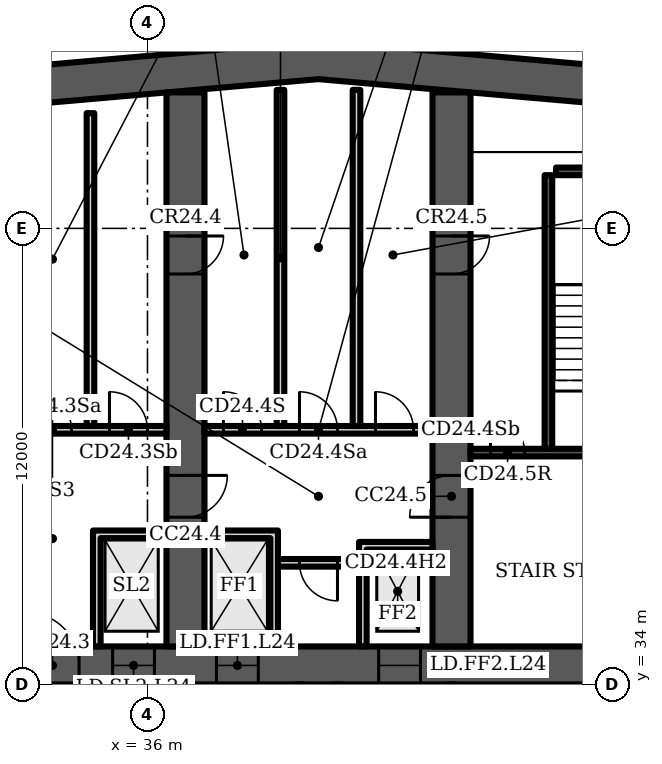
"""IFC4 building model, lengths in metres.
Left out: names, types, materials, properties, quantities, classifications, styles, units other than length and angle.
Written with IfcOpenShell. Run it as: python <this file> out.ifc"""

import sys

from ifc_helpers import new_model, si_unit, direction, frame, frame_2d, origin, place, context, subcontext, project, spatial, polyline, rectangle, outline, extrude, element, fill, save


model = new_model("IFC4")
c1 = context("Model", 3, precision=1e-05, world=origin(), true_north=direction((0.0, 1.0)))
c2 = subcontext(c1, "Body", "Model", "MODEL_VIEW")
j1 = project(units=[si_unit("LENGTHUNIT", "METRE"), si_unit("PLANEANGLEUNIT", "RADIAN")], contexts=[c1])
p1 = place(None, origin())
s1 = spatial("IfcSite", under=j1, at=p1, CompositionType="ELEMENT")
p2 = place(p1, origin())
s2 = spatial("IfcBuilding", under=s1, at=p2, CompositionType="ELEMENT")
p3 = place(p2, frame((0.0, 0.0, 107.5)))
s3 = spatial("IfcBuildingStorey", under=s2, at=p3, CompositionType="ELEMENT", Elevation=107.5)
p4 = place(p3, origin())
e1 = element("IfcWall", 1, at=p4, inside=s3, PredefinedType="SHEAR", context=c2, shape_type="SweptSolid", body=[
    extrude(outline(polyline([(16.0, 47.784), (40.5, 49.927), (65.0, 47.784), (65.0, 48.787), (40.5, 50.931), (16.0, 48.787), (16.0, 47.784)])), origin(), (0.0, 0.0, 1.0), 3.6),
])
p5 = place(p3, frame((16.0, 34.5, 0.0), z_axis=(0.0, 0.0, 1.0), x_axis=(1.0, 0.0, 0.0)))
e2 = element("IfcWall", 2, at=p5, inside=s3, PredefinedType="SHEAR", context=c2, shape_type="SweptSolid", body=[
    extrude(rectangle(XDim=49.0, YDim=1.0, at=frame_2d((24.5, 0.0))), origin(), (0.0, 0.0, 1.0), 3.6),
])
p6 = place(p5, frame((1.2, 0.0, 0.0)))
e3 = element("IfcOpeningElement", 3, at=p6, cuts=e2, PredefinedType="OPENING", context=c2, shape_type="SweptSolid", body=[
    extrude(rectangle(XDim=1.1, YDim=2.1, at=frame_2d((0.55, 1.05))), frame((0.0, 0.51, 0.0), z_axis=(0.0, -1.0, 0.0), x_axis=(1.0, 0.0, 0.0)), (0.0, 0.0, 1.0), 1.02),
])
p7 = place(p5, frame((5.083, 0.0, 0.0)))
e4 = element("IfcOpeningElement", 4, at=p7, cuts=e2, PredefinedType="OPENING", context=c2, shape_type="SweptSolid", body=[
    extrude(rectangle(XDim=1.1, YDim=2.1, at=frame_2d((0.55, 1.05))), frame((0.0, 0.51, 0.0), z_axis=(0.0, -1.0, 0.0), x_axis=(1.0, 0.0, 0.0)), (0.0, 0.0, 1.0), 1.02),
])
p8 = place(p5, frame((2.933, 0.0, 0.0)))
e5 = element("IfcOpeningElement", 5, at=p8, cuts=e2, PredefinedType="OPENING", context=c2, shape_type="SweptSolid", body=[
    extrude(rectangle(XDim=1.4, YDim=2.1, at=frame_2d((0.7, 1.05))), frame((0.0, 0.51, 0.0), z_axis=(0.0, -1.0, 0.0), x_axis=(1.0, 0.0, 0.0)), (0.0, 0.0, 1.0), 1.02),
])
p9 = place(p5, frame((7.65, 0.0, 0.0)))
e6 = element("IfcOpeningElement", 6, at=p9, cuts=e2, PredefinedType="OPENING", context=c2, shape_type="SweptSolid", body=[
    extrude(rectangle(XDim=1.2, YDim=2.1, at=frame_2d((0.6, 1.05))), frame((0.0, 0.51, 0.0), z_axis=(0.0, -1.0, 0.0), x_axis=(1.0, 0.0, 0.0)), (0.0, 0.0, 1.0), 1.02),
])
p10 = place(p5, frame((14.817, 0.0, 0.0)))
e7 = element("IfcOpeningElement", 7, at=p10, cuts=e2, PredefinedType="OPENING", context=c2, shape_type="SweptSolid", body=[
    extrude(rectangle(XDim=1.1, YDim=2.1, at=frame_2d((0.55, 1.05))), frame((0.0, 0.51, 0.0), z_axis=(0.0, -1.0, 0.0), x_axis=(1.0, 0.0, 0.0)), (0.0, 0.0, 1.0), 1.02),
])
p11 = place(p5, frame((19.083, 0.0, 0.0)))
e8 = element("IfcOpeningElement", 8, at=p11, cuts=e2, PredefinedType="OPENING", context=c2, shape_type="SweptSolid", body=[
    extrude(rectangle(XDim=1.1, YDim=2.1, at=frame_2d((0.55, 1.05))), frame((0.0, 0.51, 0.0), z_axis=(0.0, -1.0, 0.0), x_axis=(1.0, 0.0, 0.0)), (0.0, 0.0, 1.0), 1.02),
])
p12 = place(p5, frame((16.8, 0.0, 0.0)))
e9 = element("IfcOpeningElement", 9, at=p12, cuts=e2, PredefinedType="OPENING", context=c2, shape_type="SweptSolid", body=[
    extrude(rectangle(XDim=1.4, YDim=2.1, at=frame_2d((0.7, 1.05))), frame((0.0, 0.51, 0.0), z_axis=(0.0, -1.0, 0.0), x_axis=(1.0, 0.0, 0.0)), (0.0, 0.0, 1.0), 1.02),
])
p13 = place(p5, frame((21.817, 0.0, 0.0)))
e10 = element("IfcOpeningElement", 10, at=p13, cuts=e2, PredefinedType="OPENING", context=c2, shape_type="SweptSolid", body=[
    extrude(rectangle(XDim=1.1, YDim=2.1, at=frame_2d((0.55, 1.05))), frame((0.0, 0.51, 0.0), z_axis=(0.0, -1.0, 0.0), x_axis=(1.0, 0.0, 0.0)), (0.0, 0.0, 1.0), 1.02),
])
p14 = place(p5, frame((26.083, 0.0, 0.0)))
e11 = element("IfcOpeningElement", 11, at=p14, cuts=e2, PredefinedType="OPENING", context=c2, shape_type="SweptSolid", body=[
    extrude(rectangle(XDim=1.1, YDim=2.1, at=frame_2d((0.55, 1.05))), frame((0.0, 0.51, 0.0), z_axis=(0.0, -1.0, 0.0), x_axis=(1.0, 0.0, 0.0)), (0.0, 0.0, 1.0), 1.02),
])
p15 = place(p5, frame((33.15, 0.0, 0.0)))
e12 = element("IfcOpeningElement", 12, at=p15, cuts=e2, PredefinedType="OPENING", context=c2, shape_type="SweptSolid", body=[
    extrude(rectangle(XDim=1.2, YDim=2.1, at=frame_2d((0.6, 1.05))), frame((0.0, 0.51, 0.0), z_axis=(0.0, -1.0, 0.0), x_axis=(1.0, 0.0, 0.0)), (0.0, 0.0, 1.0), 1.02),
])
p16 = place(p5, frame((37.8, 0.0, 0.0)))
e13 = element("IfcOpeningElement", 13, at=p16, cuts=e2, PredefinedType="OPENING", context=c2, shape_type="SweptSolid", body=[
    extrude(rectangle(XDim=1.4, YDim=2.1, at=frame_2d((0.7, 1.05))), frame((0.0, 0.51, 0.0), z_axis=(0.0, -1.0, 0.0), x_axis=(1.0, 0.0, 0.0)), (0.0, 0.0, 1.0), 1.02),
])
p17 = place(p5, frame((42.817, 0.0, 0.0)))
e14 = element("IfcOpeningElement", 14, at=p17, cuts=e2, PredefinedType="OPENING", context=c2, shape_type="SweptSolid", body=[
    extrude(rectangle(XDim=1.1, YDim=2.1, at=frame_2d((0.55, 1.05))), frame((0.0, 0.51, 0.0), z_axis=(0.0, -1.0, 0.0), x_axis=(1.0, 0.0, 0.0)), (0.0, 0.0, 1.0), 1.02),
])
p18 = place(p5, frame((46.7, 0.0, 0.0)))
e15 = element("IfcOpeningElement", 15, at=p18, cuts=e2, PredefinedType="OPENING", context=c2, shape_type="SweptSolid", body=[
    extrude(rectangle(XDim=1.1, YDim=2.1, at=frame_2d((0.55, 1.05))), frame((0.0, 0.51, 0.0), z_axis=(0.0, -1.0, 0.0), x_axis=(1.0, 0.0, 0.0)), (0.0, 0.0, 1.0), 1.02),
])
p19 = place(p5, frame((44.667, 0.0, 0.0)))
e16 = element("IfcOpeningElement", 16, at=p19, cuts=e2, PredefinedType="OPENING", context=c2, shape_type="SweptSolid", body=[
    extrude(rectangle(XDim=1.4, YDim=2.1, at=frame_2d((0.7, 1.05))), frame((0.0, 0.51, 0.0), z_axis=(0.0, -1.0, 0.0), x_axis=(1.0, 0.0, 0.0)), (0.0, 0.0, 1.0), 1.02),
])
p20 = place(p3, frame((37.0, 35.0, 0.0), z_axis=(0.0, 0.0, 1.0), x_axis=(0.0, 1.0, 0.0)))
e17 = element("IfcWall", 17, at=p20, inside=s3, PredefinedType="SHEAR", context=c2, shape_type="SweptSolid", body=[
    extrude(rectangle(XDim=14.577, YDim=1.0, at=frame_2d((7.289, 0.0))), origin(), (0.0, 0.0, 1.0), 3.6),
])
p21 = place(p20, frame((3.4, 0.0, 0.0)))
e18 = element("IfcOpeningElement", 18, at=p21, cuts=e17, PredefinedType="OPENING", context=c2, shape_type="SweptSolid", body=[
    extrude(rectangle(XDim=1.1, YDim=2.1, at=frame_2d((0.55, 1.05))), frame((0.0, 0.51, 0.0), z_axis=(0.0, -1.0, 0.0), x_axis=(1.0, 0.0, 0.0)), (0.0, 0.0, 1.0), 1.02),
])
p22 = place(p20, frame((9.8, 0.0, 0.0)))
e19 = element("IfcOpeningElement", 19, at=p22, cuts=e17, PredefinedType="OPENING", context=c2, shape_type="SweptSolid", body=[
    extrude(rectangle(XDim=1.0, YDim=2.1, at=frame_2d((0.5, 1.05))), frame((0.0, 0.51, 0.0), z_axis=(0.0, -1.0, 0.0), x_axis=(1.0, 0.0, 0.0)), (0.0, 0.0, 1.0), 1.02),
])
p23 = place(p3, frame((44.0, 35.0, 0.0), z_axis=(0.0, 0.0, 1.0), x_axis=(0.0, 1.0, 0.0)))
e20 = element("IfcWall", 20, at=p23, inside=s3, PredefinedType="SHEAR", context=c2, shape_type="SweptSolid", body=[
    extrude(rectangle(XDim=14.577, YDim=1.0, at=frame_2d((7.289, 0.0))), origin(), (0.0, 0.0, 1.0), 3.6),
])
p24 = place(p23, frame((3.4, 0.0, 0.0)))
e21 = element("IfcOpeningElement", 21, at=p24, cuts=e20, PredefinedType="OPENING", context=c2, shape_type="SweptSolid", body=[
    extrude(rectangle(XDim=1.1, YDim=2.1, at=frame_2d((0.55, 1.05))), frame((0.0, 0.51, 0.0), z_axis=(0.0, -1.0, 0.0), x_axis=(1.0, 0.0, 0.0)), (0.0, 0.0, 1.0), 1.02),
])
p25 = place(p23, frame((9.8, 0.0, 0.0)))
e22 = element("IfcOpeningElement", 22, at=p25, cuts=e20, PredefinedType="OPENING", context=c2, shape_type="SweptSolid", body=[
    extrude(rectangle(XDim=1.0, YDim=2.1, at=frame_2d((0.5, 1.05))), frame((0.0, 0.51, 0.0), z_axis=(0.0, -1.0, 0.0), x_axis=(1.0, 0.0, 0.0)), (0.0, 0.0, 1.0), 1.02),
])
p26 = place(p3, frame((30.5, 40.7, 0.0), z_axis=(0.0, 0.0, 1.0), x_axis=(1.0, 0.0, 0.0)))
e23 = element("IfcWall", 23, at=p26, inside=s3, PredefinedType="PARTITIONING", context=c2, shape_type="SweptSolid", body=[
    extrude(rectangle(XDim=6.0, YDim=0.2, at=frame_2d((3.0, 0.0))), origin(), (0.0, 0.0, 1.0), 3.2),
])
p27 = place(p26, frame((0.5, 0.0, 0.0)))
e24 = element("IfcOpeningElement", 24, at=p27, cuts=e23, PredefinedType="OPENING", context=c2, shape_type="SweptSolid", body=[
    extrude(rectangle(XDim=1.0, YDim=2.1, at=frame_2d((0.5, 1.05))), frame((0.0, 0.11, 0.0), z_axis=(0.0, -1.0, 0.0), x_axis=(1.0, 0.0, 0.0)), (0.0, 0.0, 1.0), 0.22),
])
p28 = place(p26, frame((2.5, 0.0, 0.0)))
e25 = element("IfcOpeningElement", 25, at=p28, cuts=e23, PredefinedType="OPENING", context=c2, shape_type="SweptSolid", body=[
    extrude(rectangle(XDim=1.0, YDim=2.1, at=frame_2d((0.5, 1.05))), frame((0.0, 0.11, 0.0), z_axis=(0.0, -1.0, 0.0), x_axis=(1.0, 0.0, 0.0)), (0.0, 0.0, 1.0), 0.22),
])
p29 = place(p26, frame((4.5, 0.0, 0.0)))
e26 = element("IfcOpeningElement", 26, at=p29, cuts=e23, PredefinedType="OPENING", context=c2, shape_type="SweptSolid", body=[
    extrude(rectangle(XDim=1.0, YDim=2.1, at=frame_2d((0.5, 1.05))), frame((0.0, 0.11, 0.0), z_axis=(0.0, -1.0, 0.0), x_axis=(1.0, 0.0, 0.0)), (0.0, 0.0, 1.0), 0.22),
])
p30 = place(p3, frame((0.0, 0.0, -0.0)))
e27 = element("IfcWall", 27, at=p30, inside=s3, PredefinedType="PARTITIONING", context=c2, shape_type="SweptSolid", body=[
    extrude(outline(polyline([(34.567, 38.05), (34.767, 38.05), (36.5, 38.05), (36.5, 37.85), (34.767, 37.85), (34.767, 35.0), (34.567, 35.0), (34.567, 38.05)])), origin(), (0.0, 0.0, 1.0), 3.2),
])
p31 = place(p3, frame((34.5, 40.8, 0.0), z_axis=(0.0, 0.0, 1.0), x_axis=(0.0, 1.0, 0.0)))
e28 = element("IfcWall", 28, at=p31, inside=s3, PredefinedType="PARTITIONING", context=c2, shape_type="SweptSolid", body=[
    extrude(rectangle(XDim=8.232, YDim=0.2, at=frame_2d((4.116, 0.0))), origin(), (0.0, 0.0, 1.0), 3.2),
])
p32 = place(p3, frame((39.433, 37.2, 0.0), z_axis=(0.0, 0.0, 1.0), x_axis=(1.0, 0.0, 0.0)))
e29 = element("IfcWall", 29, at=p32, inside=s3, PredefinedType="PARTITIONING", context=c2, shape_type="SweptSolid", body=[
    extrude(rectangle(XDim=2.133, YDim=0.2, at=frame_2d((1.067, 0.0))), origin(), (0.0, 0.0, 1.0), 3.2),
])
p33 = place(p32, frame((0.567, 0.0, 0.0)))
e30 = element("IfcOpeningElement", 30, at=p33, cuts=e29, PredefinedType="OPENING", context=c2, shape_type="SweptSolid", body=[
    extrude(rectangle(XDim=1.0, YDim=2.1, at=frame_2d((0.5, 1.05))), frame((0.0, 0.11, 0.0), z_axis=(0.0, -1.0, 0.0), x_axis=(1.0, 0.0, 0.0)), (0.0, 0.0, 1.0), 0.22),
])
p34 = place(p3, frame((37.5, 40.7, 0.0), z_axis=(0.0, 0.0, 1.0), x_axis=(1.0, 0.0, 0.0)))
e31 = element("IfcWall", 31, at=p34, inside=s3, PredefinedType="PARTITIONING", context=c2, shape_type="SweptSolid", body=[
    extrude(rectangle(XDim=6.0, YDim=0.2, at=frame_2d((3.0, 0.0))), origin(), (0.0, 0.0, 1.0), 3.2),
])
p35 = place(p34, frame((0.5, 0.0, 0.0)))
e32 = element("IfcOpeningElement", 32, at=p35, cuts=e31, PredefinedType="OPENING", context=c2, shape_type="SweptSolid", body=[
    extrude(rectangle(XDim=1.0, YDim=2.1, at=frame_2d((0.5, 1.05))), frame((0.0, 0.11, 0.0), z_axis=(0.0, -1.0, 0.0), x_axis=(1.0, 0.0, 0.0)), (0.0, 0.0, 1.0), 0.22),
])
p36 = place(p34, frame((2.5, 0.0, 0.0)))
e33 = element("IfcOpeningElement", 33, at=p36, cuts=e31, PredefinedType="OPENING", context=c2, shape_type="SweptSolid", body=[
    extrude(rectangle(XDim=1.0, YDim=2.1, at=frame_2d((0.5, 1.05))), frame((0.0, 0.11, 0.0), z_axis=(0.0, -1.0, 0.0), x_axis=(1.0, 0.0, 0.0)), (0.0, 0.0, 1.0), 0.22),
])
p37 = place(p34, frame((4.5, 0.0, 0.0)))
e34 = element("IfcOpeningElement", 34, at=p37, cuts=e31, PredefinedType="OPENING", context=c2, shape_type="SweptSolid", body=[
    extrude(rectangle(XDim=1.0, YDim=2.1, at=frame_2d((0.5, 1.05))), frame((0.0, 0.11, 0.0), z_axis=(0.0, -1.0, 0.0), x_axis=(1.0, 0.0, 0.0)), (0.0, 0.0, 1.0), 0.22),
])
p38 = place(p3, frame((0.0, 0.0, -0.0)))
e35 = element("IfcWall", 35, at=p38, inside=s3, PredefinedType="PARTITIONING", context=c2, shape_type="SweptSolid", body=[
    extrude(outline(polyline([(41.567, 37.75), (41.767, 37.75), (43.5, 37.75), (43.5, 37.55), (41.767, 37.55), (41.767, 35.0), (41.567, 35.0), (41.567, 37.75)])), origin(), (0.0, 0.0, 1.0), 3.2),
])
p39 = place(p3, frame((0.0, 0.0, -0.0)))
e36 = element("IfcWall", 36, at=p39, inside=s3, PredefinedType="PARTITIONING", context=c2, shape_type="SweptSolid", body=[
    extrude(outline(polyline([(39.233, 37.85), (37.5, 37.85), (37.5, 38.05), (39.233, 38.05), (39.433, 38.05), (39.433, 35.0), (39.233, 35.0), (39.233, 37.85)])), origin(), (0.0, 0.0, 1.0), 3.2),
])
for number, where, z_axis, x_axis in (
    (37, (39.5, 40.8, 0.0), (0.0, 0.0, 1.0), (0.0, 1.0, 0.0)),
    (38, (41.5, 40.8, 0.0), (0.0, 0.0, 1.0), (0.0, 1.0, 0.0)),
):
    element("IfcWall", number, at=place(p3, frame(where, z_axis=z_axis, x_axis=x_axis)), inside=s3, PredefinedType="PARTITIONING", context=c2, shape_type="SweptSolid", body=[
        extrude(rectangle(XDim=8.844, YDim=0.2, at=frame_2d((4.422, 0.0))), origin(), (0.0, 0.0, 1.0), 3.2),
    ])
p40 = place(p3, frame((44.5, 40.1, 0.0), z_axis=(0.0, 0.0, 1.0), x_axis=(1.0, 0.0, 0.0)))
e39 = element("IfcWall", 39, at=p40, inside=s3, PredefinedType="SHEAR", context=c2, shape_type="SweptSolid", body=[
    extrude(rectangle(XDim=6.0, YDim=0.2, at=frame_2d((3.0, 0.0))), origin(), (0.0, 0.0, 1.0), 3.2),
])
p41 = place(p40, frame((3.425, 0.0, 0.0)))
e40 = element("IfcOpeningElement", 40, at=p41, cuts=e39, PredefinedType="OPENING", context=c2, shape_type="SweptSolid", body=[
    extrude(rectangle(XDim=1.2, YDim=2.1, at=frame_2d((0.6, 1.05))), frame((0.0, 0.11, 0.0), z_axis=(0.0, -1.0, 0.0), x_axis=(1.0, 0.0, 0.0)), (0.0, 0.0, 1.0), 0.22),
])
p42 = place(p40, frame((0.525, 0.0, 0.0)))
e41 = element("IfcOpeningElement", 41, at=p42, cuts=e39, PredefinedType="OPENING", context=c2, shape_type="SweptSolid", body=[
    extrude(rectangle(XDim=0.9, YDim=2.1, at=frame_2d((0.45, 1.05))), frame((0.0, 0.11, 0.0), z_axis=(0.0, -1.0, 0.0), x_axis=(1.0, 0.0, 0.0)), (0.0, 0.0, 1.0), 0.22),
])
p43 = place(p3, frame((46.55, 40.2, 0.0), z_axis=(0.0, 0.0, 1.0), x_axis=(0.0, 1.0, 0.0)))
e42 = element("IfcWall", 42, at=p43, inside=s3, PredefinedType="SHEAR", context=c2, shape_type="SweptSolid", body=[
    extrude(rectangle(XDim=7.2, YDim=0.2, at=frame_2d((3.6, 0.0))), origin(), (0.0, 0.0, 1.0), 3.2),
])
p44 = place(p3, frame((46.75, 47.5, 0.0), z_axis=(0.0, 0.0, 1.0), x_axis=(1.0, 0.0, 0.0)))
e43 = element("IfcWall", 43, at=p44, inside=s3, PredefinedType="SHEAR", context=c2, shape_type="SweptSolid", body=[
    extrude(rectangle(XDim=3.75, YDim=0.2, at=frame_2d((1.875, 0.0))), origin(), (0.0, 0.0, 1.0), 3.2),
])
p45 = place(p11, origin())
e44 = element("IfcDoor", 44, at=p45, inside=s3, OperationType="DOUBLE_DOOR_SLIDING", PredefinedType="DOOR", context=c2, shape_type="SweptSolid", body=[
    extrude(rectangle(XDim=1.1, YDim=2.1, at=frame_2d((0.55, 1.05))), frame((0.0, 0.025, 0.0), z_axis=(0.0, -1.0, 0.0), x_axis=(1.0, 0.0, 0.0)), (0.0, 0.0, 1.0), 0.05),
])
fill(e8, e44)
p46 = place(p12, origin())
e45 = element("IfcDoor", 45, at=p46, inside=s3, OperationType="DOUBLE_DOOR_SINGLE_SWING", PredefinedType="DOOR", context=c2, shape_type="SweptSolid", body=[
    extrude(rectangle(XDim=1.4, YDim=2.1, at=frame_2d((0.7, 1.05))), frame((0.0, 0.025, 0.0), z_axis=(0.0, -1.0, 0.0), x_axis=(1.0, 0.0, 0.0)), (0.0, 0.0, 1.0), 0.05),
])
fill(e9, e45)
p47 = place(p28, origin())
e46 = element("IfcDoor", 46, at=p47, inside=s3, OperationType="SINGLE_SWING_LEFT", PredefinedType="DOOR", context=c2, shape_type="SweptSolid", body=[
    extrude(rectangle(XDim=1.0, YDim=2.1, at=frame_2d((0.5, 1.05))), frame((0.0, 0.025, 0.0), z_axis=(0.0, -1.0, 0.0), x_axis=(1.0, 0.0, 0.0)), (0.0, 0.0, 1.0), 0.05),
])
fill(e25, e46)
p48 = place(p29, origin())
e47 = element("IfcDoor", 47, at=p48, inside=s3, OperationType="SINGLE_SWING_LEFT", PredefinedType="DOOR", context=c2, shape_type="SweptSolid", body=[
    extrude(rectangle(XDim=1.0, YDim=2.1, at=frame_2d((0.5, 1.05))), frame((0.0, 0.025, 0.0), z_axis=(0.0, -1.0, 0.0), x_axis=(1.0, 0.0, 0.0)), (0.0, 0.0, 1.0), 0.05),
])
fill(e26, e47)
p49 = place(p33, origin())
e48 = element("IfcDoor", 48, at=p49, inside=s3, OperationType="SINGLE_SWING_RIGHT", PredefinedType="DOOR", context=c2, shape_type="SweptSolid", body=[
    extrude(rectangle(XDim=1.0, YDim=2.1, at=frame_2d((0.5, 1.05))), frame((0.0, 0.025, 0.0), z_axis=(0.0, -1.0, 0.0), x_axis=(1.0, 0.0, 0.0)), (0.0, 0.0, 1.0), 0.05),
])
fill(e30, e48)
p50 = place(p13, origin())
e49 = element("IfcDoor", 49, at=p50, inside=s3, OperationType="DOUBLE_DOOR_SLIDING", PredefinedType="DOOR", context=c2, shape_type="SweptSolid", body=[
    extrude(rectangle(XDim=1.1, YDim=2.1, at=frame_2d((0.55, 1.05))), frame((0.0, 0.025, 0.0), z_axis=(0.0, -1.0, 0.0), x_axis=(1.0, 0.0, 0.0)), (0.0, 0.0, 1.0), 0.05),
])
fill(e10, e49)
p51 = place(p14, origin())
e50 = element("IfcDoor", 50, at=p51, inside=s3, OperationType="DOUBLE_DOOR_SLIDING", PredefinedType="DOOR", context=c2, shape_type="SweptSolid", body=[
    extrude(rectangle(XDim=1.1, YDim=2.1, at=frame_2d((0.55, 1.05))), frame((0.0, 0.025, 0.0), z_axis=(0.0, -1.0, 0.0), x_axis=(1.0, 0.0, 0.0)), (0.0, 0.0, 1.0), 0.05),
])
fill(e11, e50)
p52 = place(p35, origin())
e51 = element("IfcDoor", 51, at=p52, inside=s3, OperationType="SINGLE_SWING_LEFT", PredefinedType="DOOR", context=c2, shape_type="SweptSolid", body=[
    extrude(rectangle(XDim=1.0, YDim=2.1, at=frame_2d((0.5, 1.05))), frame((0.0, 0.025, 0.0), z_axis=(0.0, -1.0, 0.0), x_axis=(1.0, 0.0, 0.0)), (0.0, 0.0, 1.0), 0.05),
])
fill(e32, e51)
p53 = place(p36, origin())
e52 = element("IfcDoor", 52, at=p53, inside=s3, OperationType="SINGLE_SWING_LEFT", PredefinedType="DOOR", context=c2, shape_type="SweptSolid", body=[
    extrude(rectangle(XDim=1.0, YDim=2.1, at=frame_2d((0.5, 1.05))), frame((0.0, 0.025, 0.0), z_axis=(0.0, -1.0, 0.0), x_axis=(1.0, 0.0, 0.0)), (0.0, 0.0, 1.0), 0.05),
])
fill(e33, e52)
p54 = place(p37, origin())
e53 = element("IfcDoor", 53, at=p54, inside=s3, OperationType="SINGLE_SWING_LEFT", PredefinedType="DOOR", context=c2, shape_type="SweptSolid", body=[
    extrude(rectangle(XDim=1.0, YDim=2.1, at=frame_2d((0.5, 1.05))), frame((0.0, 0.025, 0.0), z_axis=(0.0, -1.0, 0.0), x_axis=(1.0, 0.0, 0.0)), (0.0, 0.0, 1.0), 0.05),
])
fill(e34, e53)
p55 = place(p42, origin())
e54 = element("IfcDoor", 54, at=p55, inside=s3, OperationType="SINGLE_SWING_LEFT", PredefinedType="DOOR", context=c2, shape_type="SweptSolid", body=[
    extrude(rectangle(XDim=0.9, YDim=2.1, at=frame_2d((0.45, 1.05))), frame((0.0, 0.025, 0.0), z_axis=(0.0, -1.0, 0.0), x_axis=(1.0, 0.0, 0.0)), (0.0, 0.0, 1.0), 0.05),
])
fill(e41, e54)
p56 = place(p21, origin())
e55 = element("IfcDoor", 55, at=p56, inside=s3, OperationType="SINGLE_SWING_RIGHT", PredefinedType="DOOR", context=c2, shape_type="SweptSolid", body=[
    extrude(rectangle(XDim=1.1, YDim=2.1, at=frame_2d((0.55, 1.05))), frame((0.0, 0.025, 0.0), z_axis=(0.0, -1.0, 0.0), x_axis=(1.0, 0.0, 0.0)), (0.0, 0.0, 1.0), 0.05),
])
fill(e18, e55)
p57 = place(p22, origin())
e56 = element("IfcDoor", 56, at=p57, inside=s3, OperationType="SINGLE_SWING_RIGHT", PredefinedType="DOOR", context=c2, shape_type="SweptSolid", body=[
    extrude(rectangle(XDim=1.0, YDim=2.1, at=frame_2d((0.5, 1.05))), frame((0.0, 0.5, 0.0), z_axis=(0.0, -1.0, 0.0), x_axis=(1.0, 0.0, 0.0)), (0.0, 0.0, 1.0), 1.0),
])
fill(e19, e56)
p58 = place(p24, origin())
e57 = element("IfcDoor", 57, at=p58, inside=s3, OperationType="SINGLE_SWING_LEFT", PredefinedType="DOOR", context=c2, shape_type="SweptSolid", body=[
    extrude(rectangle(XDim=1.1, YDim=2.1, at=frame_2d((0.55, 1.05))), frame((0.0, 0.025, 0.0), z_axis=(0.0, -1.0, 0.0), x_axis=(1.0, 0.0, 0.0)), (0.0, 0.0, 1.0), 0.05),
])
fill(e21, e57)
p59 = place(p25, origin())
e58 = element("IfcDoor", 58, at=p59, inside=s3, OperationType="SINGLE_SWING_RIGHT", PredefinedType="DOOR", context=c2, shape_type="SweptSolid", body=[
    extrude(rectangle(XDim=1.0, YDim=2.1, at=frame_2d((0.5, 1.05))), frame((0.0, 0.5, 0.0), z_axis=(0.0, -1.0, 0.0), x_axis=(1.0, 0.0, 0.0)), (0.0, 0.0, 1.0), 1.0),
])
fill(e22, e58)
save(model, sys.argv[1])
